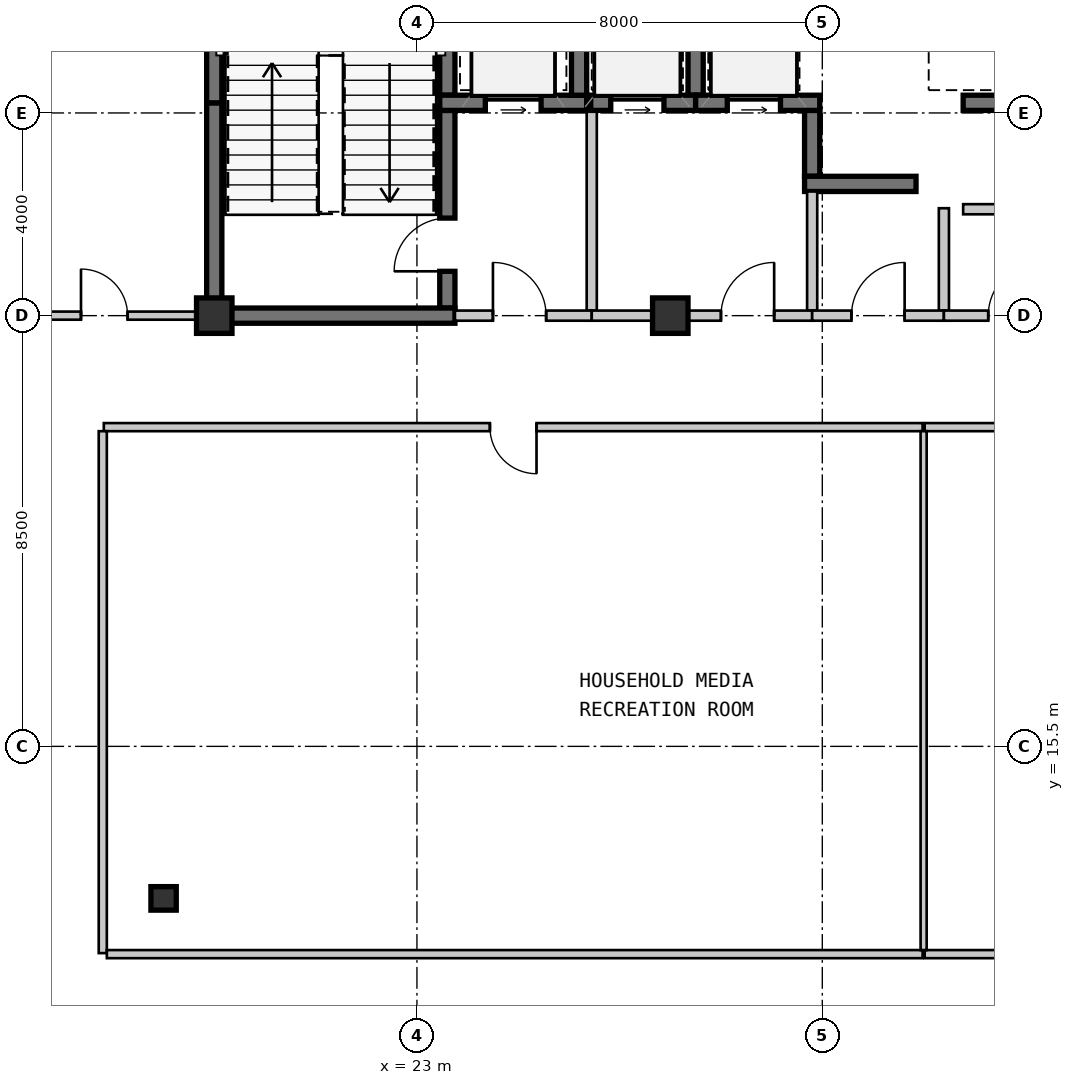
"""IFC4 building model, lengths in metres.
Left out: names, types, materials, properties, quantities, classifications, styles, units other than length and angle.
Written with IfcOpenShell. Run it as: python <this file> out.ifc"""

import sys

from ifc_helpers import new_model, si_unit, direction, frame, frame_2d, origin, origin_2d, place, context, subcontext, project, spatial, rectangle, i_section, extrude, source, transform, mapped, element, fill, save


model = new_model("IFC4")
c1 = context("Model", 3, precision=1e-05, world=origin(), true_north=direction((0.0, 1.0)))
c2 = subcontext(c1, "Body", "Model", "MODEL_VIEW")
j1 = project(units=[si_unit("LENGTHUNIT", "METRE"), si_unit("PLANEANGLEUNIT", "RADIAN")], contexts=[c1])
p1 = place(None, origin())
s1 = spatial("IfcSite", under=j1, at=p1, CompositionType="ELEMENT")
p2 = place(p1, origin())
s2 = spatial("IfcBuilding", under=s1, at=p2, CompositionType="ELEMENT")
p3 = place(p2, frame((0.0, 0.0, 80.85)))
s3 = spatial("IfcBuildingStorey", under=s2, at=p3, CompositionType="ELEMENT", Elevation=80.85)
m1 = source(origin(), c2, "Body", "SweptSolid", [
    extrude(rectangle(XDim=0.7, YDim=0.7, at=origin_2d()), origin(), (0.0, 0.0, 1.0), 3.15),
])
for number, where, z_axis, x_axis in (
    (1, (19.0, 24.0, 0.0), (0.0, 0.0, 1.0), (1.0, 0.0, 0.0)),
    (2, (28.0, 24.0, 0.0), (0.0, 0.0, 1.0), (1.0, 0.0, 0.0)),
):
    element("IfcColumn", number, at=place(p3, frame(where, z_axis=z_axis, x_axis=x_axis)), inside=s3, PredefinedType="COLUMN", context=c2, shape_type="MappedRepresentation", body=[
        mapped(m1, transform((0.0, 0.0, 0.0), scale=1.0)),
    ])
m2 = source(origin(), c2, "Body", "SweptSolid", [
    extrude(i_section(OverallWidth=0.5, OverallDepth=0.464, WebThickness=0.022, FlangeThickness=0.034, at=origin_2d()), origin(), (0.0, 0.0, 1.0), 3.15),
])
p4 = place(p3, frame((18.0, 12.5, 0.0), z_axis=(0.0, 0.0, 1.0), x_axis=(1.0, 0.0, 0.0)))
e3 = element("IfcColumn", 3, at=p4, inside=s3, PredefinedType="COLUMN", context=c2, shape_type="MappedRepresentation", body=[
    mapped(m2, transform((0.0, 0.0, 0.0), scale=1.0)),
])
m3 = source(origin(), c2, "Body", "SweptSolid", [
    extrude(rectangle(XDim=4.05, YDim=0.3, at=frame_2d((2.025, 0.0))), origin(), (0.0, 0.0, 1.0), 2.93),
])
p5 = place(p3, frame((19.0, 24.15, 0.0), z_axis=(0.0, 0.0, 1.0), x_axis=(0.0, 1.0, 0.0)))
e4 = element("IfcWall", 4, at=p5, inside=s3, PredefinedType="SHEAR", context=c2, shape_type="MappedRepresentation", body=[
    mapped(m3, transform((0.0, 0.0, 0.0), scale=1.0)),
])
m4 = source(origin(), c2, "Body", "SweptSolid", [
    extrude(rectangle(XDim=3.65, YDim=0.3, at=frame_2d((1.825, 0.0))), origin(), (0.0, 0.0, 1.0), 2.93),
])
p6 = place(p3, frame((19.0, 28.2, 0.0), z_axis=(0.0, 0.0, 1.0), x_axis=(0.0, 1.0, 0.0)))
e5 = element("IfcWall", 5, at=p6, inside=s3, PredefinedType="SHEAR", context=c2, shape_type="MappedRepresentation", body=[
    mapped(m4, transform((0.0, 0.0, 0.0), scale=1.0)),
])
m5 = source(origin(), c2, "Body", "SweptSolid", [
    extrude(rectangle(XDim=3.5, YDim=0.3, at=frame_2d((1.75, 0.0))), origin(), (0.0, 0.0, 1.0), 2.93),
])
p7 = place(p3, frame((23.6, 28.35, 0.0), z_axis=(0.0, 0.0, 1.0), x_axis=(0.0, 1.0, 0.0)))
e6 = element("IfcWall", 6, at=p7, inside=s3, PredefinedType="SHEAR", context=c2, shape_type="MappedRepresentation", body=[
    mapped(m5, transform((0.0, 0.0, 0.0), scale=1.0)),
])
m6 = source(origin(), c2, "Body", "SweptSolid", [
    extrude(rectangle(XDim=3.9, YDim=0.3, at=frame_2d((1.95, 0.0))), origin(), (0.0, 0.0, 1.0), 2.93),
])
p8 = place(p3, frame((23.6, 24.15, 0.0), z_axis=(0.0, 0.0, 1.0), x_axis=(0.0, 1.0, 0.0)))
e7 = element("IfcWall", 7, at=p8, inside=s3, PredefinedType="SHEAR", context=c2, shape_type="MappedRepresentation", body=[
    mapped(m6, transform((0.0, 0.0, 0.0), scale=1.0)),
])
m7 = source(origin(), c2, "Body", "SweptSolid", [
    extrude(rectangle(XDim=1.05, YDim=2.1, at=frame_2d((0.525, 1.05))), frame((0.0, 0.16, 0.0), z_axis=(0.0, -1.0, 0.0), x_axis=(1.0, 0.0, 0.0)), (0.0, 0.0, 1.0), 0.32),
])
p9 = place(p8, frame((0.725, 0.0, 0.0)))
e8 = element("IfcOpeningElement", 8, at=p9, cuts=e7, PredefinedType="OPENING", context=c2, shape_type="MappedRepresentation", body=[
    mapped(m7, transform((0.0, 0.0, 0.0), scale=1.0)),
])
m8 = source(origin(), c2, "Body", "SweptSolid", [
    extrude(rectangle(XDim=4.9, YDim=0.3, at=frame_2d((2.45, 0.0))), origin(), (0.0, 0.0, 1.0), 2.93),
])
p10 = place(p3, frame((18.85, 24.0, 0.0), z_axis=(0.0, 0.0, 1.0), x_axis=(1.0, 0.0, 0.0)))
e9 = element("IfcWall", 9, at=p10, inside=s3, PredefinedType="SHEAR", context=c2, shape_type="MappedRepresentation", body=[
    mapped(m8, transform((0.0, 0.0, 0.0), scale=1.0)),
])
m9 = source(origin(), c2, "Body", "SweptSolid", [
    extrude(rectangle(XDim=2.9, YDim=0.3, at=frame_2d((1.45, 0.0))), origin(), (0.0, 0.0, 1.0), 2.93),
])
p11 = place(p3, frame((23.45, 28.2, 0.0), z_axis=(0.0, 0.0, 1.0), x_axis=(1.0, 0.0, 0.0)))
e10 = element("IfcWall", 10, at=p11, inside=s3, PredefinedType="SHEAR", context=c2, shape_type="MappedRepresentation", body=[
    mapped(m9, transform((0.0, 0.0, 0.0), scale=1.0)),
])
m10 = source(origin(), c2, "Body", "SweptSolid", [
    extrude(rectangle(XDim=1.1, YDim=2.15, at=frame_2d((0.55, 1.075))), frame((0.0, 0.16, 0.0), z_axis=(0.0, -1.0, 0.0), x_axis=(1.0, 0.0, 0.0)), (0.0, 0.0, 1.0), 0.32),
])
p12 = place(p11, frame((0.9, 0.0, 0.0)))
e11 = element("IfcOpeningElement", 11, at=p12, cuts=e10, PredefinedType="OPENING", context=c2, shape_type="MappedRepresentation", body=[
    mapped(m10, transform((0.0, 0.0, 0.0), scale=1.0)),
])
p13 = place(p3, frame((26.2, 28.35, 0.0), z_axis=(0.0, 0.0, 1.0), x_axis=(0.0, 1.0, 0.0)))
e12 = element("IfcWall", 12, at=p13, inside=s3, PredefinedType="SHEAR", context=c2, shape_type="MappedRepresentation", body=[
    mapped(m5, transform((0.0, 0.0, 0.0), scale=1.0)),
])
m11 = source(origin(), c2, "Body", "SweptSolid", [
    extrude(rectangle(XDim=3.95, YDim=0.2, at=frame_2d((1.975, 0.0))), origin(), (0.0, 0.0, 1.0), 2.93),
])
p14 = place(p3, frame((26.45, 24.1, 0.0), z_axis=(0.0, 0.0, 1.0), x_axis=(0.0, 1.0, 0.0)))
e13 = element("IfcWall", 13, at=p14, inside=s3, PredefinedType="SOLIDWALL", context=c2, shape_type="MappedRepresentation", body=[
    mapped(m11, transform((0.0, 0.0, 0.0), scale=1.0)),
])
m12 = source(origin(), c2, "Body", "SweptSolid", [
    extrude(rectangle(XDim=2.7, YDim=0.2, at=frame_2d((1.35, 0.0))), origin(), (0.0, 0.0, 1.0), 2.47),
])
p15 = place(p3, frame((23.75, 24.0, 0.0), z_axis=(0.0, 0.0, 1.0), x_axis=(1.0, 0.0, 0.0)))
e14 = element("IfcWall", 14, at=p15, inside=s3, PredefinedType="SOLIDWALL", context=c2, shape_type="MappedRepresentation", body=[
    mapped(m12, transform((0.0, 0.0, 0.0), scale=1.0)),
])
m13 = source(origin(), c2, "Body", "SweptSolid", [
    extrude(rectangle(XDim=1.05, YDim=2.1, at=frame_2d((0.525, 1.05))), frame((0.0, 0.11, 0.0), z_axis=(0.0, -1.0, 0.0), x_axis=(1.0, 0.0, 0.0)), (0.0, 0.0, 1.0), 0.22),
])
p16 = place(p15, frame((0.75, 0.0, 0.0)))
e15 = element("IfcOpeningElement", 15, at=p16, cuts=e14, PredefinedType="OPENING", context=c2, shape_type="MappedRepresentation", body=[
    mapped(m13, transform((0.0, 0.0, 0.0), scale=1.0)),
])
m14 = source(origin(), c2, "Body", "SweptSolid", [
    extrude(rectangle(XDim=1.3, YDim=0.3, at=frame_2d((0.65, 0.0))), origin(), (0.0, 0.0, 1.0), 2.93),
])
p17 = place(p3, frame((30.8, 28.05, 0.0), z_axis=(0.0, 0.0, 1.0), x_axis=(0.0, -1.0, 0.0)))
e16 = element("IfcWall", 16, at=p17, inside=s3, PredefinedType="SHEAR", context=c2, shape_type="MappedRepresentation", body=[
    mapped(m14, transform((0.0, 0.0, 0.0), scale=1.0)),
])
m15 = source(origin(), c2, "Body", "SweptSolid", [
    extrude(rectangle(XDim=2.2, YDim=0.3, at=frame_2d((1.1, 0.0))), origin(), (0.0, 0.0, 1.0), 2.93),
])
p18 = place(p3, frame((30.65, 26.6, 0.0), z_axis=(0.0, 0.0, 1.0), x_axis=(1.0, 0.0, 0.0)))
e17 = element("IfcWall", 17, at=p18, inside=s3, PredefinedType="SHEAR", context=c2, shape_type="MappedRepresentation", body=[
    mapped(m15, transform((0.0, 0.0, 0.0), scale=1.0)),
])
p19 = place(p3, frame((28.5, 28.35, 0.0), z_axis=(0.0, 0.0, 1.0), x_axis=(0.0, 1.0, 0.0)))
e18 = element("IfcWall", 18, at=p19, inside=s3, PredefinedType="SHEAR", context=c2, shape_type="MappedRepresentation", body=[
    mapped(m5, transform((0.0, 0.0, 0.0), scale=1.0)),
])
m16 = source(origin(), c2, "Body", "SweptSolid", [
    extrude(rectangle(XDim=2.07, YDim=0.3, at=frame_2d((1.035, 0.0))), origin(), (0.0, 0.0, 1.0), 2.93),
])
p20 = place(p3, frame((26.43, 28.2, 0.0), z_axis=(0.0, 0.0, 1.0), x_axis=(1.0, 0.0, 0.0)))
e19 = element("IfcWall", 19, at=p20, inside=s3, PredefinedType="SHEAR", context=c2, shape_type="MappedRepresentation", body=[
    mapped(m16, transform((0.0, 0.0, 0.0), scale=1.0)),
])
m17 = source(origin(), c2, "Body", "SweptSolid", [
    extrude(rectangle(XDim=1.05, YDim=2.15, at=frame_2d((0.525, 1.075))), frame((0.0, 0.16, 0.0), z_axis=(0.0, -1.0, 0.0), x_axis=(1.0, 0.0, 0.0)), (0.0, 0.0, 1.0), 0.32),
])
p21 = place(p20, frame((0.395, 0.0, 0.0)))
e20 = element("IfcOpeningElement", 20, at=p21, cuts=e19, PredefinedType="OPENING", context=c2, shape_type="MappedRepresentation", body=[
    mapped(m17, transform((0.0, 0.0, 0.0), scale=1.0)),
])
m18 = source(origin(), c2, "Body", "SweptSolid", [
    extrude(rectangle(XDim=2.45, YDim=0.3, at=frame_2d((1.225, 0.0))), origin(), (0.0, 0.0, 1.0), 2.93),
])
p22 = place(p3, frame((28.5, 28.2, 0.0), z_axis=(0.0, 0.0, 1.0), x_axis=(1.0, 0.0, 0.0)))
e21 = element("IfcWall", 21, at=p22, inside=s3, PredefinedType="SHEAR", context=c2, shape_type="MappedRepresentation", body=[
    mapped(m18, transform((0.0, 0.0, 0.0), scale=1.0)),
])
p23 = place(p22, frame((0.625, 0.0, 0.0)))
e22 = element("IfcOpeningElement", 22, at=p23, cuts=e21, PredefinedType="OPENING", context=c2, shape_type="MappedRepresentation", body=[
    mapped(m17, transform((0.0, 0.0, 0.0), scale=1.0)),
])
m19 = source(origin(), c2, "Body", "SweptSolid", [
    extrude(rectangle(XDim=2.35, YDim=0.2, at=frame_2d((1.175, 0.0))), origin(), (0.0, 0.0, 1.0), 2.93),
])
p24 = place(p3, frame((30.8, 26.45, 0.0), z_axis=(0.0, 0.0, 1.0), x_axis=(0.0, -1.0, 0.0)))
e23 = element("IfcWall", 23, at=p24, inside=s3, PredefinedType="SOLIDWALL", context=c2, shape_type="MappedRepresentation", body=[
    mapped(m19, transform((0.0, 0.0, 0.0), scale=1.0)),
])
m20 = source(origin(), c2, "Body", "SweptSolid", [
    extrude(rectangle(XDim=4.35, YDim=0.2, at=frame_2d((2.175, 0.0))), origin(), (0.0, 0.0, 1.0), 2.47),
])
p25 = place(p3, frame((30.8, 24.0, 0.0), z_axis=(0.0, 0.0, 1.0), x_axis=(-1.0, 0.0, 0.0)))
e24 = element("IfcWall", 24, at=p25, inside=s3, PredefinedType="SOLIDWALL", context=c2, shape_type="MappedRepresentation", body=[
    mapped(m20, transform((0.0, 0.0, 0.0), scale=1.0)),
])
p26 = place(p25, frame((0.75, 0.0, 0.0)))
e25 = element("IfcOpeningElement", 25, at=p26, cuts=e24, PredefinedType="OPENING", context=c2, shape_type="MappedRepresentation", body=[
    mapped(m13, transform((0.0, 0.0, 0.0), scale=1.0)),
])
m21 = source(origin(), c2, "Body", "SweptSolid", [
    extrude(rectangle(XDim=1.52, YDim=0.3, at=frame_2d((0.76, 0.0))), origin(), (0.0, 0.0, 1.0), 2.93),
])
p27 = place(p3, frame((33.78, 28.2, 0.0), z_axis=(0.0, 0.0, 1.0), x_axis=(1.0, 0.0, 0.0)))
e26 = element("IfcWall", 26, at=p27, inside=s3, PredefinedType="SHEAR", context=c2, shape_type="MappedRepresentation", body=[
    mapped(m21, transform((0.0, 0.0, 0.0), scale=1.0)),
])
m22 = source(origin(), c2, "Body", "SweptSolid", [
    extrude(rectangle(XDim=2.02, YDim=0.2, at=frame_2d((1.01, 0.0))), origin(), (0.0, 0.0, 1.0), 2.93),
])
p28 = place(p3, frame((33.4, 26.12, 0.0), z_axis=(0.0, 0.0, 1.0), x_axis=(0.0, -1.0, 0.0)))
e27 = element("IfcWall", 27, at=p28, inside=s3, PredefinedType="SOLIDWALL", context=c2, shape_type="MappedRepresentation", body=[
    mapped(m22, transform((0.0, 0.0, 0.0), scale=1.0)),
])
m23 = source(origin(), c2, "Body", "SweptSolid", [
    extrude(rectangle(XDim=2.6, YDim=0.2, at=frame_2d((1.3, 0.0))), origin(), (0.0, 0.0, 1.0), 2.47),
])
p29 = place(p3, frame((33.4, 24.0, 0.0), z_axis=(0.0, 0.0, 1.0), x_axis=(-1.0, 0.0, 0.0)))
e28 = element("IfcWall", 28, at=p29, inside=s3, PredefinedType="SOLIDWALL", context=c2, shape_type="MappedRepresentation", body=[
    mapped(m23, transform((0.0, 0.0, 0.0), scale=1.0)),
])
p30 = place(p29, frame((0.775, 0.0, 0.0)))
e29 = element("IfcOpeningElement", 29, at=p30, cuts=e28, PredefinedType="OPENING", context=c2, shape_type="MappedRepresentation", body=[
    mapped(m13, transform((0.0, 0.0, 0.0), scale=1.0)),
])
m24 = source(origin(), c2, "Body", "SweptSolid", [
    extrude(rectangle(XDim=2.42, YDim=0.2, at=frame_2d((1.21, 0.0))), origin(), (0.0, 0.0, 1.0), 2.93),
])
p31 = place(p3, frame((33.78, 26.1, 0.0), z_axis=(0.0, 0.0, 1.0), x_axis=(1.0, 0.0, 0.0)))
e30 = element("IfcWall", 30, at=p31, inside=s3, PredefinedType="SOLIDWALL", context=c2, shape_type="MappedRepresentation", body=[
    mapped(m24, transform((0.0, 0.0, 0.0), scale=1.0)),
])
p32 = place(p31, frame((0.685, 0.0, 0.0)))
e31 = element("IfcOpeningElement", 31, at=p32, cuts=e30, PredefinedType="OPENING", context=c2, shape_type="MappedRepresentation", body=[
    mapped(m13, transform((0.0, 0.0, 0.0), scale=1.0)),
])
m25 = source(origin(), c2, "Body", "SweptSolid", [
    extrude(rectangle(XDim=2.8, YDim=0.2, at=frame_2d((1.4, 0.0))), origin(), (0.0, 0.0, 1.0), 2.47),
])
p33 = place(p3, frame((36.2, 24.0, 0.0), z_axis=(0.0, 0.0, 1.0), x_axis=(-1.0, 0.0, 0.0)))
e32 = element("IfcWall", 32, at=p33, inside=s3, PredefinedType="SOLIDWALL", context=c2, shape_type="MappedRepresentation", body=[
    mapped(m25, transform((0.0, 0.0, 0.0), scale=1.0)),
])
p34 = place(p33, frame((0.875, 0.0, 0.0)))
e33 = element("IfcOpeningElement", 33, at=p34, cuts=e32, PredefinedType="OPENING", context=c2, shape_type="MappedRepresentation", body=[
    mapped(m13, transform((0.0, 0.0, 0.0), scale=1.0)),
])
m26 = source(origin(), c2, "Body", "SweptSolid", [
    extrude(rectangle(XDim=16.159, YDim=0.16, at=frame_2d((8.08, 0.0))), origin(), (0.0, 0.0, 1.0), 2.93),
])
p35 = place(p3, frame((32.98, 21.8, 0.0), z_axis=(0.0, 0.0, 1.0), x_axis=(-1.0, 0.0, 0.0)))
e34 = element("IfcWall", 34, at=p35, inside=s3, PredefinedType="PARTITIONING", context=c2, shape_type="MappedRepresentation", body=[
    mapped(m26, transform((0.0, 0.0, 0.0), scale=1.0)),
])
m27 = source(origin(), c2, "Body", "SweptSolid", [
    extrude(rectangle(XDim=0.92, YDim=2.1, at=frame_2d((0.46, 1.05))), frame((0.0, 0.09, 0.0), z_axis=(0.0, -1.0, 0.0), x_axis=(1.0, 0.0, 0.0)), (0.0, 0.0, 1.0), 0.18),
])
p36 = place(p35, frame((7.62, 0.0, 0.0)))
e35 = element("IfcOpeningElement", 35, at=p36, cuts=e34, PredefinedType="OPENING", context=c2, shape_type="MappedRepresentation", body=[
    mapped(m27, transform((0.0, 0.0, 0.0), scale=1.0)),
])
m28 = source(origin(), c2, "Body", "SweptSolid", [
    extrude(rectangle(XDim=10.3, YDim=0.16, at=frame_2d((5.15, 0.0))), origin(), (0.0, 0.0, 1.0), 2.93),
])
p37 = place(p3, frame((16.8, 21.72, 0.0), z_axis=(0.0, 0.0, 1.0), x_axis=(0.0, -1.0, 0.0)))
e36 = element("IfcWall", 36, at=p37, inside=s3, PredefinedType="PARTITIONING", context=c2, shape_type="MappedRepresentation", body=[
    mapped(m28, transform((0.0, 0.0, 0.0), scale=1.0)),
])
m29 = source(origin(), c2, "Body", "SweptSolid", [
    extrude(rectangle(XDim=9.959, YDim=0.16, at=frame_2d((4.98, 0.0))), origin(), (0.0, 0.0, 1.0), 2.93),
])
p38 = place(p3, frame((42.98, 21.8, 0.0), z_axis=(0.0, 0.0, 1.0), x_axis=(-1.0, 0.0, 0.0)))
e37 = element("IfcWall", 37, at=p38, inside=s3, PredefinedType="PARTITIONING", context=c2, shape_type="MappedRepresentation", body=[
    mapped(m29, transform((0.0, 0.0, 0.0), scale=1.0)),
])
m30 = source(origin(), c2, "Body", "SweptSolid", [
    extrude(rectangle(XDim=1.05, YDim=2.1, at=frame_2d((0.525, 1.05))), frame((0.0, 0.09, 0.0), z_axis=(0.0, -1.0, 0.0), x_axis=(1.0, 0.0, 0.0)), (0.0, 0.0, 1.0), 0.18),
])
p39 = place(p38, frame((4.455, 0.0, 0.0)))
e38 = element("IfcOpeningElement", 38, at=p39, cuts=e37, PredefinedType="OPENING", context=c2, shape_type="MappedRepresentation", body=[
    mapped(m30, transform((0.0, 0.0, 0.0), scale=1.0)),
])
m31 = source(origin(), c2, "Body", "SweptSolid", [
    extrude(rectangle(XDim=4.17, YDim=0.16, at=frame_2d((2.085, 0.0))), origin(), (0.0, 0.0, 1.0), 2.93),
])
p40 = place(p3, frame((14.68, 24.0, 0.0), z_axis=(0.0, 0.0, 1.0), x_axis=(1.0, 0.0, 0.0)))
e39 = element("IfcWall", 39, at=p40, inside=s3, PredefinedType="PARTITIONING", context=c2, shape_type="MappedRepresentation", body=[
    mapped(m31, transform((0.0, 0.0, 0.0), scale=1.0)),
])
p41 = place(p40, frame((1.69, 0.0, 0.0)))
e40 = element("IfcOpeningElement", 40, at=p41, cuts=e39, PredefinedType="OPENING", context=c2, shape_type="MappedRepresentation", body=[
    mapped(m27, transform((0.0, 0.0, 0.0), scale=1.0)),
])
m32 = source(origin(), c2, "Body", "SweptSolid", [
    extrude(rectangle(XDim=16.1, YDim=0.16, at=frame_2d((8.05, 0.0))), origin(), (0.0, 0.0, 1.0), 2.93),
])
p42 = place(p3, frame((16.88, 11.4, 0.0), z_axis=(0.0, 0.0, 1.0), x_axis=(1.0, 0.0, 0.0)))
e41 = element("IfcWall", 41, at=p42, inside=s3, PredefinedType="PARTITIONING", context=c2, shape_type="MappedRepresentation", body=[
    mapped(m32, transform((0.0, 0.0, 0.0), scale=1.0)),
])
p43 = place(p3, frame((33.02, 11.4, 0.0), z_axis=(0.0, 0.0, 1.0), x_axis=(1.0, 0.0, 0.0)))
e42 = element("IfcWall", 42, at=p43, inside=s3, PredefinedType="PARTITIONING", context=c2, shape_type="MappedRepresentation", body=[
    mapped(m29, transform((0.0, 0.0, 0.0), scale=1.0)),
])
m33 = source(origin(), c2, "Body", "SweptSolid", [
    extrude(rectangle(XDim=10.24, YDim=0.12, at=frame_2d((5.12, 0.0))), origin(), (0.0, 0.0, 1.0), 2.93),
])
p44 = place(p3, frame((33.0, 21.72, 0.0), z_axis=(0.0, 0.0, 1.0), x_axis=(0.0, -1.0, 0.0)))
e43 = element("IfcWall", 43, at=p44, inside=s3, PredefinedType="PARTITIONING", context=c2, shape_type="MappedRepresentation", body=[
    mapped(m33, transform((0.0, 0.0, 0.0), scale=1.0)),
])
m34 = source(origin(), c2, "Body", "SweptSolid", [
    extrude(rectangle(XDim=1.05, YDim=2.1, at=frame_2d((0.525, 1.05))), frame((0.0, 0.025, 0.0), z_axis=(0.0, -1.0, 0.0), x_axis=(1.0, 0.0, 0.0)), (0.0, 0.0, 1.0), 0.05),
])
p45 = place(p9, origin())
e44 = element("IfcDoor", 44, at=p45, inside=s3, OperationType="SINGLE_SWING_LEFT", PredefinedType="DOOR", context=c2, shape_type="MappedRepresentation", body=[
    mapped(m34, transform((0.0, 0.0, 0.0), scale=1.0)),
])
fill(e8, e44)
m35 = source(origin(), c2, "Body", "SweptSolid", [
    extrude(rectangle(XDim=1.1, YDim=2.15, at=frame_2d((0.55, 1.075))), frame((0.0, 0.025, 0.0), z_axis=(0.0, -1.0, 0.0), x_axis=(1.0, 0.0, 0.0)), (0.0, 0.0, 1.0), 0.05),
])
p46 = place(p12, origin())
e45 = element("IfcDoor", 45, at=p46, inside=s3, OperationType="SLIDING_TO_LEFT", PredefinedType="DOOR", context=c2, shape_type="MappedRepresentation", body=[
    mapped(m35, transform((0.0, 0.0, 0.0), scale=1.0)),
])
fill(e11, e45)
p47 = place(p16, origin())
e46 = element("IfcDoor", 46, at=p47, inside=s3, OperationType="SINGLE_SWING_LEFT", PredefinedType="DOOR", context=c2, shape_type="MappedRepresentation", body=[
    mapped(m34, transform((0.0, 0.0, 0.0), scale=1.0)),
])
fill(e15, e46)
m36 = source(origin(), c2, "Body", "SweptSolid", [
    extrude(rectangle(XDim=1.05, YDim=2.15, at=frame_2d((0.525, 1.075))), frame((0.0, 0.025, 0.0), z_axis=(0.0, -1.0, 0.0), x_axis=(1.0, 0.0, 0.0)), (0.0, 0.0, 1.0), 0.05),
])
p48 = place(p21, origin())
e47 = element("IfcDoor", 47, at=p48, inside=s3, OperationType="SLIDING_TO_LEFT", PredefinedType="DOOR", context=c2, shape_type="MappedRepresentation", body=[
    mapped(m36, transform((0.0, 0.0, 0.0), scale=1.0)),
])
fill(e20, e47)
p49 = place(p23, origin())
e48 = element("IfcDoor", 48, at=p49, inside=s3, OperationType="SLIDING_TO_LEFT", PredefinedType="DOOR", context=c2, shape_type="MappedRepresentation", body=[
    mapped(m36, transform((0.0, 0.0, 0.0), scale=1.0)),
])
fill(e22, e48)
p50 = place(p26, frame((1.05, 0.0, 0.0), z_axis=(0.0, 0.0, 1.0), x_axis=(-1.0, 0.0, 0.0)))
e49 = element("IfcDoor", 49, at=p50, inside=s3, OperationType="SINGLE_SWING_RIGHT", PredefinedType="DOOR", context=c2, shape_type="MappedRepresentation", body=[
    mapped(m34, transform((0.0, 0.0, 0.0), scale=1.0)),
])
fill(e25, e49)
p51 = place(p30, frame((1.05, 0.0, 0.0), z_axis=(0.0, 0.0, 1.0), x_axis=(-1.0, 0.0, 0.0)))
e50 = element("IfcDoor", 50, at=p51, inside=s3, OperationType="SINGLE_SWING_RIGHT", PredefinedType="DOOR", context=c2, shape_type="MappedRepresentation", body=[
    mapped(m34, transform((0.0, 0.0, 0.0), scale=1.0)),
])
fill(e29, e50)
p52 = place(p34, frame((1.05, 0.0, 0.0), z_axis=(0.0, 0.0, 1.0), x_axis=(-1.0, 0.0, 0.0)))
e51 = element("IfcDoor", 51, at=p52, inside=s3, OperationType="SINGLE_SWING_RIGHT", PredefinedType="DOOR", context=c2, shape_type="MappedRepresentation", body=[
    mapped(m34, transform((0.0, 0.0, 0.0), scale=1.0)),
])
fill(e33, e51)
m37 = source(origin(), c2, "Body", "SweptSolid", [
    extrude(rectangle(XDim=0.92, YDim=2.1, at=frame_2d((0.46, 1.05))), frame((0.0, 0.025, 0.0), z_axis=(0.0, -1.0, 0.0), x_axis=(1.0, 0.0, 0.0)), (0.0, 0.0, 1.0), 0.05),
])
p53 = place(p36, origin())
e52 = element("IfcDoor", 52, at=p53, inside=s3, OperationType="SINGLE_SWING_LEFT", PredefinedType="DOOR", context=c2, shape_type="MappedRepresentation", body=[
    mapped(m37, transform((0.0, 0.0, 0.0), scale=1.0)),
])
fill(e35, e52)
p54 = place(p41, origin())
e53 = element("IfcDoor", 53, at=p54, inside=s3, OperationType="SINGLE_SWING_LEFT", PredefinedType="DOOR", context=c2, shape_type="MappedRepresentation", body=[
    mapped(m37, transform((0.0, 0.0, 0.0), scale=1.0)),
])
fill(e40, e53)
save(model, sys.argv[1])
